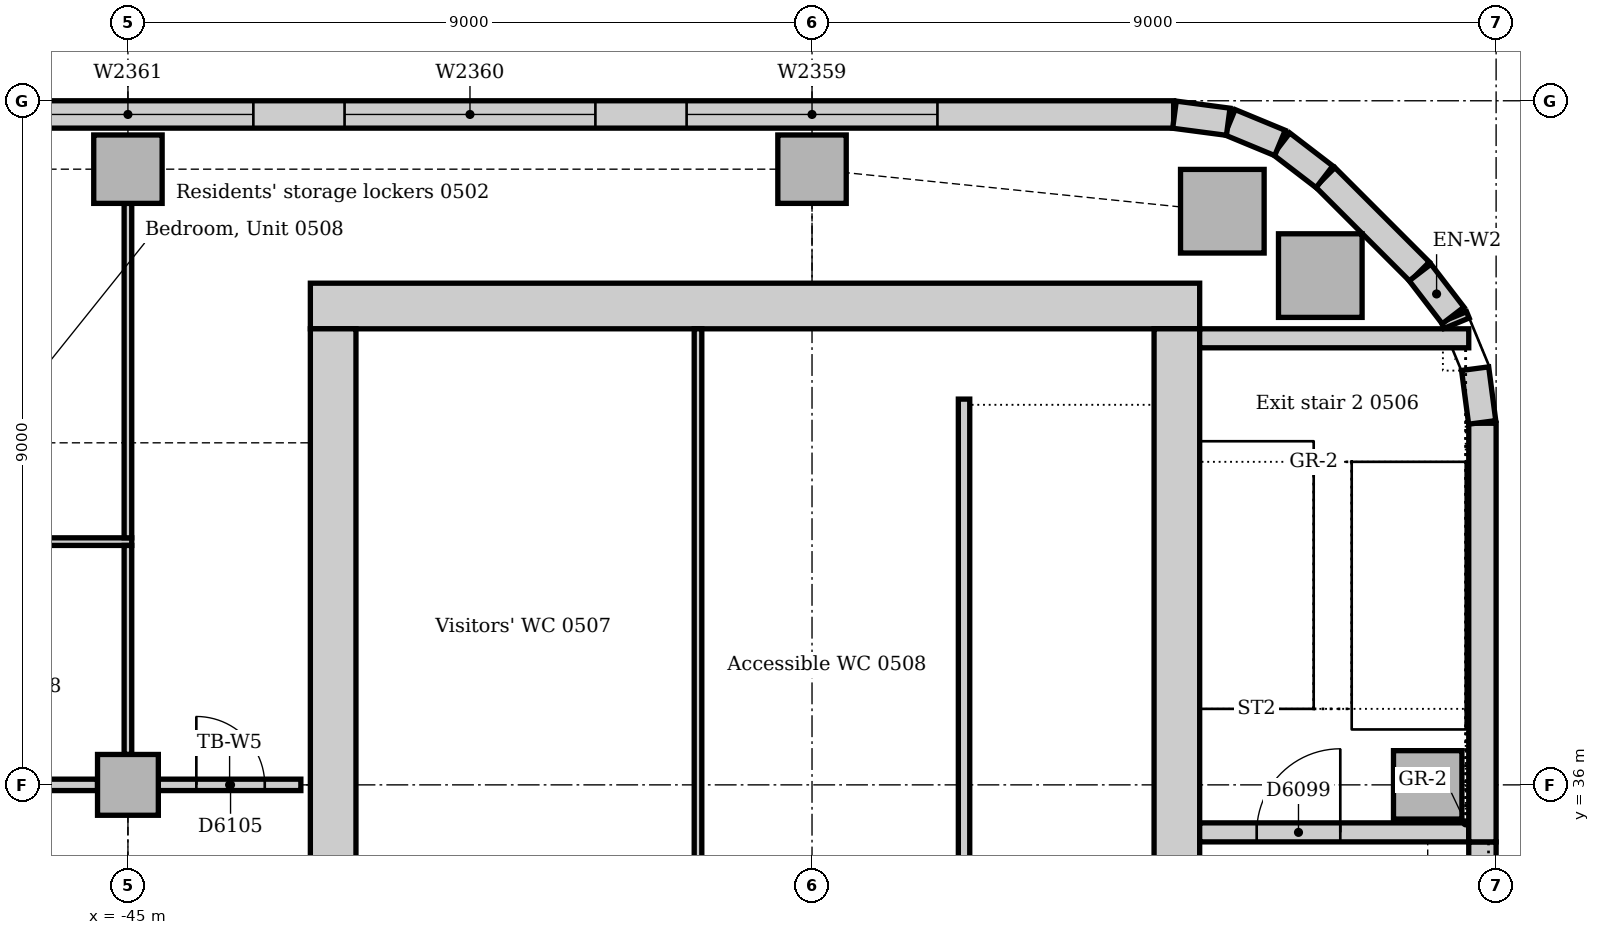
"""IFC4 building model, lengths in metres.
Left out: names, types, materials, properties, quantities, classifications, styles, units other than length and angle.
Written with IfcOpenShell. Run it as: python <this file> out.ifc"""

import sys

from ifc_helpers import new_model, si_unit, direction, frame, frame_2d, origin, origin_2d, place, context, subcontext, project, spatial, rectangle, extrude, element, fill, save


model = new_model("IFC4")
c1 = context("Model", 3, precision=1e-05, world=origin(), true_north=direction((0.0, 1.0)))
c2 = subcontext(c1, "Body", "Model", "MODEL_VIEW")
j1 = project(units=[si_unit("LENGTHUNIT", "METRE"), si_unit("PLANEANGLEUNIT", "RADIAN")], contexts=[c1])
p1 = place(None, origin())
s1 = spatial("IfcSite", under=j1, at=p1, CompositionType="ELEMENT")
p2 = place(p1, origin())
s2 = spatial("IfcBuilding", under=s1, at=p2, CompositionType="ELEMENT")
p3 = place(p2, frame((0.0, 0.0, 26.0)))
s3 = spatial("IfcBuildingStorey", under=s2, at=p3, CompositionType="ELEMENT", Elevation=26.0)
p4 = place(p3, frame((-30.9, 42.3, 0.0), z_axis=(0.0, 0.0, 1.0), x_axis=(-1.0, 0.0, 0.0)))
e1 = element("IfcWall", 1, at=p4, inside=s3, PredefinedType="SOLIDWALL", context=c2, shape_type="SweptSolid", body=[
    extrude(rectangle(XDim=11.7, YDim=0.6, at=frame_2d((5.85, 0.0))), origin(), (0.0, 0.0, 1.0), 4.0),
])
p5 = place(p3, frame((-31.2, 30.5, 0.0), z_axis=(0.0, 0.0, 1.0), x_axis=(0.0, 1.0, 0.0)))
e2 = element("IfcWall", 2, at=p5, inside=s3, PredefinedType="SOLIDWALL", context=c2, shape_type="SweptSolid", body=[
    extrude(rectangle(XDim=11.5, YDim=0.6, at=frame_2d((5.75, 0.0))), origin(), (0.0, 0.0, 1.0), 4.0),
])
p6 = place(p5, frame((0.85, 0.0, 0.0)))
e3 = element("IfcOpeningElement", 3, at=p6, cuts=e2, PredefinedType="OPENING", context=c2, shape_type="SweptSolid", body=[
    extrude(rectangle(XDim=1.8, YDim=2.1, at=frame_2d((0.9, 1.05))), frame((0.0, 0.31, 0.0), z_axis=(0.0, -1.0, 0.0), x_axis=(1.0, 0.0, 0.0)), (0.0, 0.0, 1.0), 0.62),
])
p7 = place(p3, frame((-42.3, 42.0, 0.0), z_axis=(0.0, 0.0, 1.0), x_axis=(0.0, -1.0, 0.0)))
e4 = element("IfcWall", 4, at=p7, inside=s3, PredefinedType="SOLIDWALL", context=c2, shape_type="SweptSolid", body=[
    extrude(rectangle(XDim=11.5, YDim=0.6, at=frame_2d((5.75, 0.0))), origin(), (0.0, 0.0, 1.0), 4.0),
])
p8 = place(p7, frame((8.85, 0.0, 0.0)))
e5 = element("IfcOpeningElement", 5, at=p8, cuts=e4, PredefinedType="OPENING", context=c2, shape_type="SweptSolid", body=[
    extrude(rectangle(XDim=1.8, YDim=2.1, at=frame_2d((0.9, 1.05))), frame((0.0, 0.31, 0.0), z_axis=(0.0, -1.0, 0.0), x_axis=(1.0, 0.0, 0.0)), (0.0, 0.0, 1.0), 0.62),
])
p9 = place(p3, frame((-30.9, 35.375, 0.0), z_axis=(0.0, 0.0, 1.0), x_axis=(1.0, 0.0, 0.0)))
e6 = element("IfcWall", 6, at=p9, inside=s3, PredefinedType="SOLIDWALL", context=c2, shape_type="SweptSolid", body=[
    extrude(rectangle(XDim=3.54, YDim=0.25, at=frame_2d((1.77, 0.0))), origin(), (0.0, 0.0, 1.0), 4.0),
])
p10 = place(p9, frame((0.75, 0.0, 0.0)))
e7 = element("IfcOpeningElement", 7, at=p10, cuts=e6, PredefinedType="OPENING", context=c2, shape_type="SweptSolid", body=[
    extrude(rectangle(XDim=1.1, YDim=2.1, at=frame_2d((0.55, 1.05))), frame((0.0, 0.135, 0.0), z_axis=(0.0, -1.0, 0.0), x_axis=(1.0, 0.0, 0.0)), (0.0, 0.0, 1.0), 0.27),
])
p11 = place(p3, frame((-27.36, 41.875, 0.0), z_axis=(0.0, 0.0, 1.0), x_axis=(-1.0, 0.0, 0.0)))
e8 = element("IfcWall", 8, at=p11, inside=s3, PredefinedType="SOLIDWALL", context=c2, shape_type="SweptSolid", body=[
    extrude(rectangle(XDim=3.54, YDim=0.25, at=frame_2d((1.77, 0.0))), origin(), (0.0, 0.0, 1.0), 4.0),
])
for number, where, z_axis, x_axis in (
    (9, (-29.313, 42.7, 0.0), (0.0, 0.0, 1.0), (1.0, 0.0, 0.0)),
    (10, (-30.602, 43.547, 0.0), (0.0, 0.0, 1.0), (1.0, 0.0, 0.0)),
):
    element("IfcColumn", number, at=place(p3, frame(where, z_axis=z_axis, x_axis=x_axis)), inside=s3, PredefinedType="COLUMN", context=c2, shape_type="SweptSolid", body=[
        extrude(rectangle(XDim=1.1, YDim=1.1, at=origin_2d()), origin(), (0.0, 0.0, 1.0), 3.85),
    ])
p12 = place(p3, frame((-27.9, 36.0, 0.0), z_axis=(0.0, 0.0, 1.0), x_axis=(1.0, 0.0, 0.0)))
e11 = element("IfcColumn", 11, at=p12, inside=s3, PredefinedType="COLUMN", context=c2, shape_type="SweptSolid", body=[
    extrude(rectangle(XDim=0.9, YDim=0.9, at=origin_2d()), origin(), (0.0, 0.0, 1.0), 4.0),
])
for number, where, z_axis, x_axis in (
    (12, (-45.0, 44.1, 0.0), (0.0, 0.0, 1.0), (1.0, 0.0, 0.0)),
    (13, (-36.0, 44.1, 0.0), (0.0, 0.0, 1.0), (1.0, 0.0, 0.0)),
):
    element("IfcColumn", number, at=place(p3, frame(where, z_axis=z_axis, x_axis=x_axis)), inside=s3, PredefinedType="COLUMN", context=c2, shape_type="SweptSolid", body=[
        extrude(rectangle(XDim=0.9, YDim=0.9, at=origin_2d()), origin(), (0.0, 0.0, 1.0), 3.85),
    ])
p13 = place(p3, frame((-45.0, 36.0, 0.0), z_axis=(0.0, 0.0, 1.0), x_axis=(1.0, 0.0, 0.0)))
e14 = element("IfcColumn", 14, at=p13, inside=s3, PredefinedType="COLUMN", context=c2, shape_type="SweptSolid", body=[
    extrude(rectangle(XDim=0.8, YDim=0.8, at=origin_2d()), origin(), (0.0, 0.0, 1.0), 3.85),
])
p14 = place(p3, frame((-27.18, 27.75, 0.0), z_axis=(0.0, 0.0, 1.0), x_axis=(0.0, 1.0, 0.0)))
e15 = element("IfcWall", 15, at=p14, inside=s3, PredefinedType="STANDARD", context=c2, shape_type="SweptSolid", body=[
    extrude(rectangle(XDim=7.5, YDim=0.36, at=frame_2d((3.75, 0.0))), origin(), (0.0, 0.0, 1.0), 3.85),
])
p15 = place(p14, frame((2.85, 0.0, 1.2)))
e16 = element("IfcOpeningElement", 16, at=p15, cuts=e15, PredefinedType="OPENING", context=c2, shape_type="SweptSolid", body=[
    extrude(rectangle(XDim=1.8, YDim=1.2, at=frame_2d((0.9, 0.6))), frame((0.0, 0.19, 0.0), z_axis=(0.0, -1.0, 0.0), x_axis=(1.0, 0.0, 0.0)), (0.0, 0.0, 1.0), 0.38),
])
p16 = place(p3, frame((-27.18, 35.25, 0.0), z_axis=(0.0, 0.0, 1.0), x_axis=(0.0, 1.0, 0.0)))
e17 = element("IfcWall", 17, at=p16, inside=s3, PredefinedType="STANDARD", context=c2, shape_type="SweptSolid", body=[
    extrude(rectangle(XDim=5.507, YDim=0.36, at=frame_2d((2.754, 0.0))), origin(), (0.0, 0.0, 1.0), 3.85),
])
p17 = place(p3, frame((-28.006, 42.751, 0.0), z_axis=(0.0, 0.0, 1.0), x_axis=(-0.707106781187, 0.707106781187, 0.0)))
e18 = element("IfcWall", 18, at=p17, inside=s3, PredefinedType="STANDARD", context=c2, shape_type="SweptSolid", body=[
    extrude(rectangle(XDim=1.757, YDim=0.36, at=frame_2d((0.879, 0.0))), origin(), (0.0, 0.0, 1.0), 3.85),
])
p18 = place(p3, frame((-31.243, 44.82, 0.0), z_axis=(0.0, 0.0, 1.0), x_axis=(-1.0, 0.0, 0.0)))
e19 = element("IfcWall", 19, at=p18, inside=s3, PredefinedType="STANDARD", context=c2, shape_type="SweptSolid", body=[
    extrude(rectangle(XDim=36.515, YDim=0.36, at=frame_2d((18.257, 0.0))), origin(), (0.0, 0.0, 1.0), 3.85),
])
p19 = place(p18, frame((3.107, 0.0, 0.9)))
e20 = element("IfcOpeningElement", 20, at=p19, cuts=e19, PredefinedType="OPENING", context=c2, shape_type="SweptSolid", body=[
    extrude(rectangle(XDim=3.3, YDim=1.6, at=frame_2d((1.65, 0.8))), frame((0.0, 0.19, 0.0), z_axis=(0.0, -1.0, 0.0), x_axis=(1.0, 0.0, 0.0)), (0.0, 0.0, 1.0), 0.38),
])
p20 = place(p18, frame((7.607, 0.0, 0.9)))
e21 = element("IfcOpeningElement", 21, at=p20, cuts=e19, PredefinedType="OPENING", context=c2, shape_type="SweptSolid", body=[
    extrude(rectangle(XDim=3.3, YDim=1.6, at=frame_2d((1.65, 0.8))), frame((0.0, 0.19, 0.0), z_axis=(0.0, -1.0, 0.0), x_axis=(1.0, 0.0, 0.0)), (0.0, 0.0, 1.0), 0.38),
])
p21 = place(p18, frame((12.107, 0.0, 0.9)))
e22 = element("IfcOpeningElement", 22, at=p21, cuts=e19, PredefinedType="OPENING", context=c2, shape_type="SweptSolid", body=[
    extrude(rectangle(XDim=3.3, YDim=1.6, at=frame_2d((1.65, 0.8))), frame((0.0, 0.19, 0.0), z_axis=(0.0, -1.0, 0.0), x_axis=(1.0, 0.0, 0.0)), (0.0, 0.0, 1.0), 0.38),
])
p22 = place(p18, frame((16.607, 0.0, 0.9)))
e23 = element("IfcOpeningElement", 23, at=p22, cuts=e19, PredefinedType="OPENING", context=c2, shape_type="SweptSolid", body=[
    extrude(rectangle(XDim=3.3, YDim=1.6, at=frame_2d((1.65, 0.8))), frame((0.0, 0.19, 0.0), z_axis=(0.0, -1.0, 0.0), x_axis=(1.0, 0.0, 0.0)), (0.0, 0.0, 1.0), 0.38),
])
p23 = place(p18, frame((21.107, 0.0, 0.9)))
e24 = element("IfcOpeningElement", 24, at=p23, cuts=e19, PredefinedType="OPENING", context=c2, shape_type="SweptSolid", body=[
    extrude(rectangle(XDim=3.3, YDim=1.6, at=frame_2d((1.65, 0.8))), frame((0.0, 0.19, 0.0), z_axis=(0.0, -1.0, 0.0), x_axis=(1.0, 0.0, 0.0)), (0.0, 0.0, 1.0), 0.38),
])
p24 = place(p18, frame((25.607, 0.0, 0.9)))
e25 = element("IfcOpeningElement", 25, at=p24, cuts=e19, PredefinedType="OPENING", context=c2, shape_type="SweptSolid", body=[
    extrude(rectangle(XDim=3.3, YDim=1.6, at=frame_2d((1.65, 0.8))), frame((0.0, 0.19, 0.0), z_axis=(0.0, -1.0, 0.0), x_axis=(1.0, 0.0, 0.0)), (0.0, 0.0, 1.0), 0.38),
])
p25 = place(p18, frame((30.107, 0.0, 0.9)))
e26 = element("IfcOpeningElement", 26, at=p25, cuts=e19, PredefinedType="OPENING", context=c2, shape_type="SweptSolid", body=[
    extrude(rectangle(XDim=3.3, YDim=1.6, at=frame_2d((1.65, 0.8))), frame((0.0, 0.19, 0.0), z_axis=(0.0, -1.0, 0.0), x_axis=(1.0, 0.0, 0.0)), (0.0, 0.0, 1.0), 0.38),
])
p26 = place(p3, frame((-27.183, 40.769, 0.0), z_axis=(0.0, 0.0, 1.0), x_axis=(-0.13055608231, 0.99144092581, 0.0)))
e27 = element("IfcWall", 27, at=p26, inside=s3, PredefinedType="STANDARD", context=c2, shape_type="SweptSolid", body=[
    extrude(rectangle(XDim=0.713, YDim=0.36, at=frame_2d((0.356, 0.0))), origin(), (0.0, 0.0, 1.0), 3.85),
])
p27 = place(p3, frame((-27.521, 42.074, 0.0), z_axis=(0.0, 0.0, 1.0), x_axis=(-0.382549378284, 0.923935048136, 0.0)))
e28 = element("IfcWall", 28, at=p27, inside=s3, PredefinedType="STANDARD", context=c2, shape_type="SweptSolid", body=[
    extrude(rectangle(XDim=0.089, YDim=0.36, at=frame_2d((0.045, 0.0))), origin(), (0.0, 0.0, 1.0), 3.85),
])
for number, where, z_axis, x_axis in (
    (29, (-27.566, 42.175, 0.0), (0.0, 0.0, 1.0), (-0.609, 0.793, 0.0)),
    (30, (-29.259, 44.0, 0.0), (0.0, 0.0, 1.0), (-0.793, 0.609, 0.0)),
):
    element("IfcWall", number, at=place(p3, frame(where, z_axis=z_axis, x_axis=x_axis)), inside=s3, PredefinedType="STANDARD", context=c2, shape_type="SweptSolid", body=[
        extrude(rectangle(XDim=0.713, YDim=0.36, at=frame_2d((0.357, 0.0))), origin(), (0.0, 0.0, 1.0), 3.85),
    ])
for number, where, z_axis, x_axis in (
    (31, (-29.844, 44.445, 0.0), (0.0, 0.0, 1.0), (-0.924, 0.383, 0.0)),
    (32, (-30.524, 44.724, 0.0), (0.0, 0.0, 1.0), (-0.991, 0.131, 0.0)),
):
    element("IfcWall", number, at=place(p3, frame(where, z_axis=z_axis, x_axis=x_axis)), inside=s3, PredefinedType="STANDARD", context=c2, shape_type="SweptSolid", body=[
        extrude(rectangle(XDim=0.713, YDim=0.36, at=frame_2d((0.356, 0.0))), origin(), (0.0, 0.0, 1.0), 3.85),
    ])
p28 = place(p3, frame((-34.0, 41.075, 0.0), z_axis=(0.0, 0.0, 1.0), x_axis=(0.0, -1.0, 0.0)))
e33 = element("IfcWall", 33, at=p28, inside=s3, PredefinedType="SOLIDWALL", context=c2, shape_type="SweptSolid", body=[
    extrude(rectangle(XDim=7.0, YDim=0.15, at=frame_2d((3.5, 0.0))), origin(), (0.0, 0.0, 1.0), 4.0),
])
p29 = place(p3, frame((-37.5, 34.075, 0.0), z_axis=(0.0, 0.0, 1.0), x_axis=(0.0, 1.0, 0.0)))
e34 = element("IfcWall", 34, at=p29, inside=s3, PredefinedType="PARTITIONING", context=c2, shape_type="SweptSolid", body=[
    extrude(rectangle(XDim=7.925, YDim=0.1, at=frame_2d((3.962, 0.0))), origin(), (0.0, 0.0, 1.0), 3.85),
])
p30 = place(p3, frame((-44.6, 36.0, 0.0), z_axis=(0.0, 0.0, 1.0), x_axis=(1.0, 0.0, 0.0)))
e35 = element("IfcWall", 35, at=p30, inside=s3, PredefinedType="PARTITIONING", context=c2, shape_type="SweptSolid", body=[
    extrude(rectangle(XDim=1.875, YDim=0.15, at=frame_2d((0.938, 0.0))), origin(), (0.0, 0.0, 1.0), 3.602),
])
p31 = place(p30, frame((0.5, 0.0, 0.0)))
e36 = element("IfcOpeningElement", 36, at=p31, cuts=e35, PredefinedType="OPENING", context=c2, shape_type="SweptSolid", body=[
    extrude(rectangle(XDim=0.9, YDim=2.1, at=frame_2d((0.45, 1.05))), frame((0.0, 0.085, 0.0), z_axis=(0.0, -1.0, 0.0), x_axis=(1.0, 0.0, 0.0)), (0.0, 0.0, 1.0), 0.17),
])
p32 = place(p3, frame((-53.6, 36.0, 0.0), z_axis=(0.0, 0.0, 1.0), x_axis=(1.0, 0.0, 0.0)))
e37 = element("IfcWall", 37, at=p32, inside=s3, PredefinedType="PARTITIONING", context=c2, shape_type="SweptSolid", body=[
    extrude(rectangle(XDim=8.2, YDim=0.15, at=frame_2d((4.1, 0.0))), origin(), (0.0, 0.0, 1.0), 3.15),
])
p33 = place(p32, frame((2.89, 0.0, 0.0)))
e38 = element("IfcOpeningElement", 38, at=p33, cuts=e37, PredefinedType="OPENING", context=c2, shape_type="SweptSolid", body=[
    extrude(rectangle(XDim=1.0, YDim=2.1, at=frame_2d((0.5, 1.05))), frame((0.0, 0.085, 0.0), z_axis=(0.0, -1.0, 0.0), x_axis=(1.0, 0.0, 0.0)), (0.0, 0.0, 1.0), 0.17),
])
p34 = place(p3, frame((-53.925, 39.2, 0.0), z_axis=(0.0, 0.0, 1.0), x_axis=(1.0, 0.0, 0.0)))
e39 = element("IfcWall", 39, at=p34, inside=s3, PredefinedType="PARTITIONING", context=c2, shape_type="SweptSolid", body=[
    extrude(rectangle(XDim=8.975, YDim=0.1, at=frame_2d((4.487, 0.0))), origin(), (0.0, 0.0, 1.0), 3.85),
])
p35 = place(p34, frame((3.265, 0.0, 0.0)))
e40 = element("IfcOpeningElement", 40, at=p35, cuts=e39, PredefinedType="OPENING", context=c2, shape_type="SweptSolid", body=[
    extrude(rectangle(XDim=0.9, YDim=2.1, at=frame_2d((0.45, 1.05))), frame((0.0, 0.06, 0.0), z_axis=(0.0, -1.0, 0.0), x_axis=(1.0, 0.0, 0.0)), (0.0, 0.0, 1.0), 0.12),
])
p36 = place(p3, frame((-45.0, 39.25, 0.0), z_axis=(0.0, 0.0, 1.0), x_axis=(0.0, 1.0, 0.0)))
e41 = element("IfcWall", 41, at=p36, inside=s3, PredefinedType="PARTITIONING", context=c2, shape_type="SweptSolid", body=[
    extrude(rectangle(XDim=4.4, YDim=0.1, at=frame_2d((2.2, 0.0))), origin(), (0.0, 0.0, 1.0), 3.158),
])
p37 = place(p3, frame((-45.0, 36.4, 0.0), z_axis=(0.0, 0.0, 1.0), x_axis=(0.0, 1.0, 0.0)))
e42 = element("IfcWall", 42, at=p37, inside=s3, PredefinedType="PARTITIONING", context=c2, shape_type="SweptSolid", body=[
    extrude(rectangle(XDim=2.75, YDim=0.1, at=frame_2d((1.375, 0.0))), origin(), (0.0, 0.0, 1.0), 3.158),
])
p38 = place(p19, origin())
e43 = element("IfcWindow", 43, at=p38, inside=s3, PartitioningType="SINGLE_PANEL", PredefinedType="WINDOW", context=c2, shape_type="SweptSolid", body=[
    extrude(rectangle(XDim=3.3, YDim=1.6, at=frame_2d((1.65, 0.8))), frame((0.0, 0.13, 0.0), z_axis=(0.0, -1.0, 0.0), x_axis=(1.0, 0.0, 0.0)), (0.0, 0.0, 1.0), 0.06),
])
fill(e20, e43)
p39 = place(p20, origin())
e44 = element("IfcWindow", 44, at=p39, inside=s3, PartitioningType="SINGLE_PANEL", PredefinedType="WINDOW", context=c2, shape_type="SweptSolid", body=[
    extrude(rectangle(XDim=3.3, YDim=1.6, at=frame_2d((1.65, 0.8))), frame((0.0, 0.13, 0.0), z_axis=(0.0, -1.0, 0.0), x_axis=(1.0, 0.0, 0.0)), (0.0, 0.0, 1.0), 0.06),
])
fill(e21, e44)
p40 = place(p21, origin())
e45 = element("IfcWindow", 45, at=p40, inside=s3, PartitioningType="SINGLE_PANEL", PredefinedType="WINDOW", context=c2, shape_type="SweptSolid", body=[
    extrude(rectangle(XDim=3.3, YDim=1.6, at=frame_2d((1.65, 0.8))), frame((0.0, 0.13, 0.0), z_axis=(0.0, -1.0, 0.0), x_axis=(1.0, 0.0, 0.0)), (0.0, 0.0, 1.0), 0.06),
])
fill(e22, e45)
p41 = place(p10, origin())
e46 = element("IfcDoor", 46, at=p41, inside=s3, OperationType="SINGLE_SWING_RIGHT", PredefinedType="DOOR", context=c2, shape_type="SweptSolid", body=[
    extrude(rectangle(XDim=1.1, YDim=2.1, at=frame_2d((0.55, 1.05))), frame((0.0, 0.025, 0.0), z_axis=(0.0, -1.0, 0.0), x_axis=(1.0, 0.0, 0.0)), (0.0, 0.0, 1.0), 0.05),
])
fill(e7, e46)
p42 = place(p31, origin())
e47 = element("IfcDoor", 47, at=p42, inside=s3, OperationType="SINGLE_SWING_LEFT", PredefinedType="DOOR", context=c2, shape_type="SweptSolid", body=[
    extrude(rectangle(XDim=0.9, YDim=2.1, at=frame_2d((0.45, 1.05))), frame((0.0, 0.025, 0.0), z_axis=(0.0, -1.0, 0.0), x_axis=(1.0, 0.0, 0.0)), (0.0, 0.0, 1.0), 0.05),
])
fill(e36, e47)
save(model, sys.argv[1])
